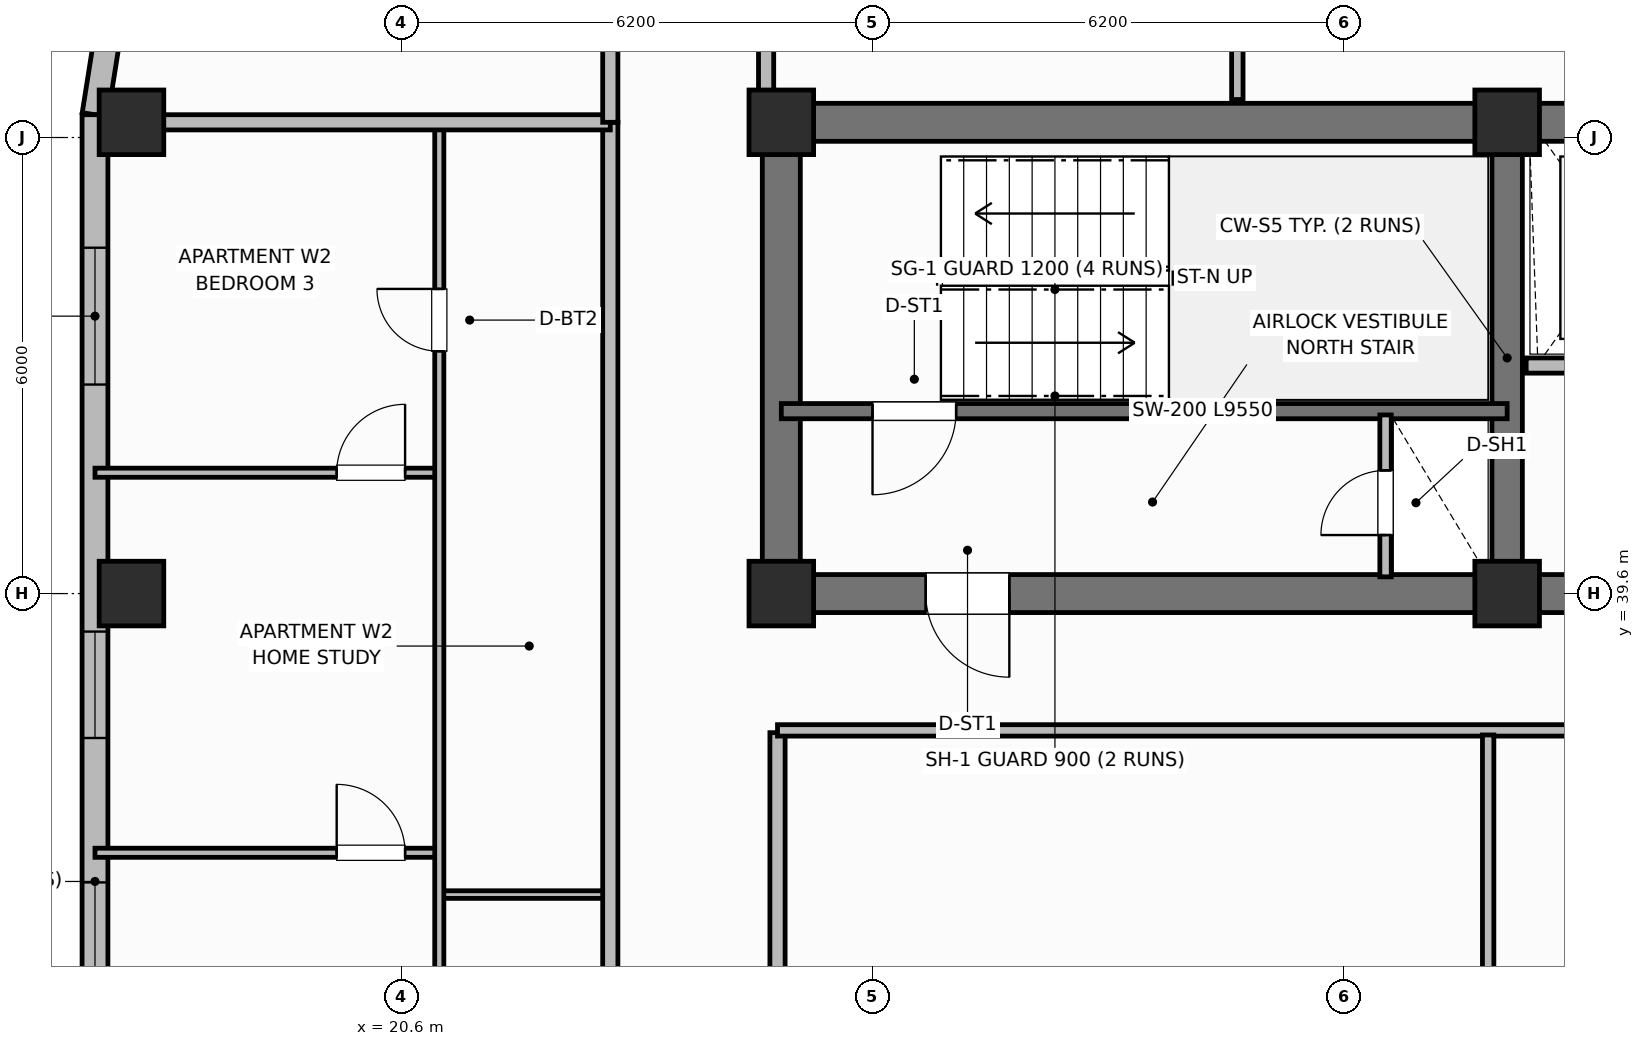
"""IFC4 building model, lengths in metres.
Left out: names, types, materials, properties, quantities, classifications, styles, units other than length and angle.
Written with IfcOpenShell. Run it as: python <this file> out.ifc"""

import sys

from ifc_helpers import new_model, si_unit, direction, frame, frame_2d, origin, origin_2d, place, context, subcontext, project, spatial, rectangle, extrude, element, fill, save


model = new_model("IFC4")
c1 = context("Model", 3, precision=1e-05, world=origin(), true_north=direction((0.0, 1.0)))
c2 = subcontext(c1, "Body", "Model", "MODEL_VIEW")
j1 = project(units=[si_unit("LENGTHUNIT", "METRE"), si_unit("PLANEANGLEUNIT", "RADIAN")], contexts=[c1])
p1 = place(None, origin())
s1 = spatial("IfcSite", under=j1, at=p1, CompositionType="ELEMENT")
p2 = place(p1, origin())
s2 = spatial("IfcBuilding", under=s1, at=p2, CompositionType="ELEMENT")
p3 = place(p2, frame((0.0, 0.0, 207.3)))
s3 = spatial("IfcBuildingStorey", under=s2, at=p3, CompositionType="ELEMENT", Elevation=207.3)
p4 = place(p3, frame((25.6, 45.8, 0.0), z_axis=(0.0, 0.0, 1.0), x_axis=(1.0, 0.0, 0.0)))
e1 = element("IfcWall", 1, at=p4, inside=s3, PredefinedType="SHEAR", context=c2, shape_type="SweptSolid", body=[
    extrude(rectangle(XDim=27.2, YDim=0.5, at=frame_2d((13.6, 0.0))), origin(), (0.0, 0.0, 1.0), 3.7),
])
p5 = place(p3, frame((25.6, 39.85, 0.0), z_axis=(0.0, 0.0, 1.0), x_axis=(0.0, 1.0, 0.0)))
e2 = element("IfcWall", 2, at=p5, inside=s3, PredefinedType="SHEAR", context=c2, shape_type="SweptSolid", body=[
    extrude(rectangle(XDim=5.7, YDim=0.5, at=frame_2d((2.85, 0.0))), origin(), (0.0, 0.0, 1.0), 3.7),
])
p6 = place(p3, frame((52.8, 39.6, 0.0), z_axis=(0.0, 0.0, 1.0), x_axis=(-1.0, 0.0, 0.0)))
e3 = element("IfcWall", 3, at=p6, inside=s3, PredefinedType="SHEAR", context=c2, shape_type="SweptSolid", body=[
    extrude(rectangle(XDim=27.2, YDim=0.5, at=frame_2d((13.6, 0.0))), origin(), (0.0, 0.0, 1.0), 3.7),
])
p7 = place(p6, frame((24.2, 0.0, 0.0)))
e4 = element("IfcOpeningElement", 4, at=p7, cuts=e3, PredefinedType="OPENING", context=c2, shape_type="SweptSolid", body=[
    extrude(rectangle(XDim=1.1, YDim=2.15, at=frame_2d((0.55, 1.075))), frame((0.0, 0.26, 0.0), z_axis=(0.0, -1.0, 0.0), x_axis=(1.0, 0.0, 0.0)), (0.0, 0.0, 1.0), 0.52),
])
p8 = place(p6, frame((15.1, 0.0, 0.0)))
e5 = element("IfcOpeningElement", 5, at=p8, cuts=e3, PredefinedType="OPENING", context=c2, shape_type="SweptSolid", body=[
    extrude(rectangle(XDim=1.2, YDim=2.15, at=frame_2d((0.6, 1.075))), frame((0.0, 0.26, 0.0), z_axis=(0.0, -1.0, 0.0), x_axis=(1.0, 0.0, 0.0)), (0.0, 0.0, 1.0), 0.52),
])
p9 = place(p6, frame((11.6, 0.0, 0.0)))
e6 = element("IfcOpeningElement", 6, at=p9, cuts=e3, PredefinedType="OPENING", context=c2, shape_type="SweptSolid", body=[
    extrude(rectangle(XDim=0.9, YDim=2.1, at=frame_2d((0.45, 1.05))), frame((0.0, 0.26, 0.0), z_axis=(0.0, -1.0, 0.0), x_axis=(1.0, 0.0, 0.0)), (0.0, 0.0, 1.0), 0.52),
])
p10 = place(p6, frame((7.35, 0.0, 0.0)))
e7 = element("IfcOpeningElement", 7, at=p10, cuts=e3, PredefinedType="OPENING", context=c2, shape_type="SweptSolid", body=[
    extrude(rectangle(XDim=0.85, YDim=2.1, at=frame_2d((0.425, 1.05))), frame((0.0, 0.26, 0.0), z_axis=(0.0, -1.0, 0.0), x_axis=(1.0, 0.0, 0.0)), (0.0, 0.0, 1.0), 0.52),
])
p11 = place(p6, frame((4.2, 0.0, 0.0)))
e8 = element("IfcOpeningElement", 8, at=p11, cuts=e3, PredefinedType="OPENING", context=c2, shape_type="SweptSolid", body=[
    extrude(rectangle(XDim=1.3, YDim=2.2, at=frame_2d((0.65, 1.1))), frame((0.0, 0.26, 0.0), z_axis=(0.0, -1.0, 0.0), x_axis=(1.0, 0.0, 0.0)), (0.0, 0.0, 1.0), 0.52),
])
p12 = place(p3, frame((35.15, 39.85, 0.0), z_axis=(0.0, 0.0, 1.0), x_axis=(0.0, 1.0, 0.0)))
e9 = element("IfcWall", 9, at=p12, inside=s3, PredefinedType="SHEAR", context=c2, shape_type="SweptSolid", body=[
    extrude(rectangle(XDim=5.7, YDim=0.4, at=frame_2d((2.85, 0.0))), origin(), (0.0, 0.0, 1.0), 3.7),
])
for number, where, z_axis, x_axis in (
    (10, (25.6, 39.6, 0.0), (0.0, 0.0, 1.0), (1.0, 0.0, 0.0)),
    (11, (25.6, 45.8, 0.0), (0.0, 0.0, 1.0), (1.0, 0.0, 0.0)),
    (12, (35.15, 39.6, 0.0), (0.0, 0.0, 1.0), (1.0, 0.0, 0.0)),
    (13, (35.15, 45.8, 0.0), (0.0, 0.0, 1.0), (1.0, 0.0, 0.0)),
    (14, (17.05, 39.6, 0.0), (0.0, 0.0, 1.0), (1.0, 0.0, 0.0)),
    (15, (17.05, 45.8, 0.0), (0.0, 0.0, 1.0), (1.0, 0.0, 0.0)),
):
    element("IfcColumn", number, at=place(p3, frame(where, z_axis=z_axis, x_axis=x_axis)), inside=s3, PredefinedType="COLUMN", context=c2, shape_type="SweptSolid", body=[
        extrude(rectangle(XDim=0.85, YDim=0.85, at=origin_2d()), origin(), (0.0, 0.0, 1.0), 3.7),
    ])
p13 = place(p3, frame((16.748, 47.022, 0.0), z_axis=(0.0, 0.0, 1.0), x_axis=(-0.156481329164, -0.987680916907, 0.0)))
e16 = element("IfcWall", 16, at=p13, inside=s3, PredefinedType="SOLIDWALL", context=c2, shape_type="SweptSolid", body=[
    extrude(rectangle(XDim=1.136, YDim=0.34, at=frame_2d((0.568, 0.0))), origin(), (0.0, 0.0, 1.0), 2.72),
])
p14 = place(p3, frame((16.57, 45.9, 0.0), z_axis=(0.0, 0.0, 1.0), x_axis=(0.0, -1.0, 0.0)))
e17 = element("IfcWall", 17, at=p14, inside=s3, PredefinedType="SOLIDWALL", context=c2, shape_type="SweptSolid", body=[
    extrude(rectangle(XDim=13.3, YDim=0.34, at=frame_2d((6.65, 0.0))), origin(), (0.0, 0.0, 1.0), 2.72),
])
p15 = place(p14, frame((1.75, 0.0, 0.75)))
e18 = element("IfcOpeningElement", 18, at=p15, cuts=e17, PredefinedType="OPENING", context=c2, shape_type="SweptSolid", body=[
    extrude(rectangle(XDim=1.8, YDim=1.85, at=frame_2d((0.9, 0.925))), frame((0.0, 0.18, 0.0), z_axis=(0.0, -1.0, 0.0), x_axis=(1.0, 0.0, 0.0)), (0.0, 0.0, 1.0), 0.36),
])
p16 = place(p14, frame((6.8, 0.0, 0.71)))
e19 = element("IfcOpeningElement", 19, at=p16, cuts=e17, PredefinedType="OPENING", context=c2, shape_type="SweptSolid", body=[
    extrude(rectangle(XDim=1.4, YDim=1.85, at=frame_2d((0.7, 0.925))), frame((0.0, 0.18, 0.0), z_axis=(0.0, -1.0, 0.0), x_axis=(1.0, 0.0, 0.0)), (0.0, 0.0, 1.0), 0.36),
])
p17 = place(p14, frame((10.1, 0.0, 0.75)))
e20 = element("IfcOpeningElement", 20, at=p17, cuts=e17, PredefinedType="OPENING", context=c2, shape_type="SweptSolid", body=[
    extrude(rectangle(XDim=1.8, YDim=1.85, at=frame_2d((0.9, 0.925))), frame((0.0, 0.18, 0.0), z_axis=(0.0, -1.0, 0.0), x_axis=(1.0, 0.0, 0.0)), (0.0, 0.0, 1.0), 0.36),
])
p18 = place(p3, frame((35.15, 42.0, 0.0), z_axis=(0.0, 0.0, 1.0), x_axis=(-1.0, 0.0, 0.0)))
e21 = element("IfcWall", 21, at=p18, inside=s3, PredefinedType="SHEAR", context=c2, shape_type="SweptSolid", body=[
    extrude(rectangle(XDim=9.55, YDim=0.2, at=frame_2d((4.775, 0.0))), origin(), (0.0, 0.0, 1.0), 3.7),
])
p19 = place(p18, frame((7.25, 0.0, 0.0)))
e22 = element("IfcOpeningElement", 22, at=p19, cuts=e21, PredefinedType="OPENING", context=c2, shape_type="SweptSolid", body=[
    extrude(rectangle(XDim=1.1, YDim=2.15, at=frame_2d((0.55, 1.075))), frame((0.0, 0.11, 0.0), z_axis=(0.0, -1.0, 0.0), x_axis=(1.0, 0.0, 0.0)), (0.0, 0.0, 1.0), 0.22),
])
p20 = place(p3, frame((33.55, 39.82, 0.0), z_axis=(0.0, 0.0, 1.0), x_axis=(0.0, 1.0, 0.0)))
e23 = element("IfcWall", 23, at=p20, inside=s3, PredefinedType="PARTITIONING", context=c2, shape_type="SweptSolid", body=[
    extrude(rectangle(XDim=2.13, YDim=0.15, at=frame_2d((1.065, 0.0))), origin(), (0.0, 0.0, 1.0), 2.55),
])
p21 = place(p20, frame((0.55, 0.0, 0.0)))
e24 = element("IfcOpeningElement", 24, at=p21, cuts=e23, PredefinedType="OPENING", context=c2, shape_type="SweptSolid", body=[
    extrude(rectangle(XDim=0.85, YDim=2.05, at=frame_2d((0.425, 1.025))), frame((0.0, 0.085, 0.0), z_axis=(0.0, -1.0, 0.0), x_axis=(1.0, 0.0, 0.0)), (0.0, 0.0, 1.0), 0.17),
])
p22 = place(p3, frame((37.95, 42.6, 0.0), z_axis=(0.0, 0.0, 1.0), x_axis=(-1.0, 0.0, 0.0)))
e25 = element("IfcWall", 25, at=p22, inside=s3, PredefinedType="PARTITIONING", context=c2, shape_type="SweptSolid", body=[
    extrude(rectangle(XDim=2.55, YDim=0.2, at=frame_2d((1.275, 0.0))), origin(), (0.0, 0.0, 1.0), 2.32),
])
p23 = place(p22, frame((0.75, 0.0, 0.0)))
e26 = element("IfcOpeningElement", 26, at=p23, cuts=e25, PredefinedType="OPENING", context=c2, shape_type="SweptSolid", body=[
    extrude(rectangle(XDim=1.1, YDim=2.15, at=frame_2d((0.55, 1.075))), frame((0.0, 0.11, 0.0), z_axis=(0.0, -1.0, 0.0), x_axis=(1.0, 0.0, 0.0)), (0.0, 0.0, 1.0), 0.22),
])
p24 = place(p3, frame((25.55, 18.63, 0.0), z_axis=(0.0, 0.0, 1.0), x_axis=(0.0, 1.0, 0.0)))
e27 = element("IfcWall", 27, at=p24, inside=s3, PredefinedType="PARTITIONING", context=c2, shape_type="SweptSolid", body=[
    extrude(rectangle(XDim=19.14, YDim=0.2, at=frame_2d((9.57, 0.0))), origin(), (0.0, 0.0, 1.0), 2.55),
])
p25 = place(p3, frame((25.55, 37.8, 0.0), z_axis=(0.0, 0.0, 1.0), x_axis=(1.0, 0.0, 0.0)))
e28 = element("IfcWall", 28, at=p25, inside=s3, PredefinedType="PARTITIONING", context=c2, shape_type="SweptSolid", body=[
    extrude(rectangle(XDim=22.2, YDim=0.15, at=frame_2d((11.1, 0.0))), origin(), (0.0, 0.0, 1.0), 2.55),
])
p26 = place(p3, frame((34.9, 18.66, 0.0), z_axis=(0.0, 0.0, 1.0), x_axis=(0.0, 1.0, 0.0)))
e29 = element("IfcWall", 29, at=p26, inside=s3, PredefinedType="PARTITIONING", context=c2, shape_type="SweptSolid", body=[
    extrude(rectangle(XDim=19.08, YDim=0.15, at=frame_2d((9.54, 0.0))), origin(), (0.0, 0.0, 1.0), 2.55),
])
p27 = place(p26, frame((5.0, 0.0, 0.0)))
e30 = element("IfcOpeningElement", 30, at=p27, cuts=e29, PredefinedType="OPENING", context=c2, shape_type="SweptSolid", body=[
    extrude(rectangle(XDim=1.0, YDim=2.15, at=frame_2d((0.5, 1.075))), frame((0.0, 0.085, 0.0), z_axis=(0.0, -1.0, 0.0), x_axis=(1.0, 0.0, 0.0)), (0.0, 0.0, 1.0), 0.17),
])
p28 = place(p3, frame((21.1, 35.64, 0.0), z_axis=(0.0, 0.0, 1.0), x_axis=(1.0, 0.0, 0.0)))
e31 = element("IfcWall", 31, at=p28, inside=s3, PredefinedType="PARTITIONING", context=c2, shape_type="SweptSolid", body=[
    extrude(rectangle(XDim=2.25, YDim=0.1, at=frame_2d((1.125, 0.0))), origin(), (0.0, 0.0, 1.0), 2.55),
])
p29 = place(p3, frame((16.57, 36.19, 0.0), z_axis=(0.0, 0.0, 1.0), x_axis=(1.0, 0.0, 0.0)))
e32 = element("IfcWall", 32, at=p29, inside=s3, PredefinedType="PARTITIONING", context=c2, shape_type="SweptSolid", body=[
    extrude(rectangle(XDim=4.53, YDim=0.12, at=frame_2d((2.265, 0.0))), origin(), (0.0, 0.0, 1.0), 2.55),
])
p30 = place(p29, frame((3.18, 0.0, 0.0)))
e33 = element("IfcOpeningElement", 33, at=p30, cuts=e32, PredefinedType="OPENING", context=c2, shape_type="SweptSolid", body=[
    extrude(rectangle(XDim=0.9, YDim=2.1, at=frame_2d((0.45, 1.05))), frame((0.0, 0.07, 0.0), z_axis=(0.0, -1.0, 0.0), x_axis=(1.0, 0.0, 0.0)), (0.0, 0.0, 1.0), 0.14),
])
p31 = place(p3, frame((16.57, 41.19, 0.0), z_axis=(0.0, 0.0, 1.0), x_axis=(1.0, 0.0, 0.0)))
e34 = element("IfcWall", 34, at=p31, inside=s3, PredefinedType="PARTITIONING", context=c2, shape_type="SweptSolid", body=[
    extrude(rectangle(XDim=4.53, YDim=0.12, at=frame_2d((2.265, 0.0))), origin(), (0.0, 0.0, 1.0), 2.55),
])
p32 = place(p31, frame((3.18, 0.0, 0.0)))
e35 = element("IfcOpeningElement", 35, at=p32, cuts=e34, PredefinedType="OPENING", context=c2, shape_type="SweptSolid", body=[
    extrude(rectangle(XDim=0.9, YDim=2.1, at=frame_2d((0.45, 1.05))), frame((0.0, 0.07, 0.0), z_axis=(0.0, -1.0, 0.0), x_axis=(1.0, 0.0, 0.0)), (0.0, 0.0, 1.0), 0.14),
])
p33 = place(p3, frame((21.1, 26.48, 0.0), z_axis=(0.0, 0.0, 1.0), x_axis=(0.0, 1.0, 0.0)))
e36 = element("IfcWall", 36, at=p33, inside=s3, PredefinedType="PARTITIONING", context=c2, shape_type="SweptSolid", body=[
    extrude(rectangle(XDim=19.28, YDim=0.12, at=frame_2d((9.64, 0.0))), origin(), (0.0, 0.0, 1.0), 2.55),
])
p34 = place(p33, frame((3.01, 0.0, 0.0)))
e37 = element("IfcOpeningElement", 37, at=p34, cuts=e36, PredefinedType="OPENING", context=c2, shape_type="SweptSolid", body=[
    extrude(rectangle(XDim=0.9, YDim=2.1, at=frame_2d((0.45, 1.05))), frame((0.0, 0.07, 0.0), z_axis=(0.0, -1.0, 0.0), x_axis=(1.0, 0.0, 0.0)), (0.0, 0.0, 1.0), 0.14),
])
p35 = place(p33, frame((16.308, 0.0, 0.0)))
e38 = element("IfcOpeningElement", 38, at=p35, cuts=e36, PredefinedType="OPENING", context=c2, shape_type="SweptSolid", body=[
    extrude(rectangle(XDim=0.82, YDim=2.08, at=frame_2d((0.41, 1.04))), frame((0.0, 0.07, 0.0), z_axis=(0.0, -1.0, 0.0), x_axis=(1.0, 0.0, 0.0)), (0.0, 0.0, 1.0), 0.14),
])
p36 = place(p3, frame((23.35, 10.6, 0.0), z_axis=(0.0, 0.0, 1.0), x_axis=(0.0, 1.0, 0.0)))
e39 = element("IfcWall", 39, at=p36, inside=s3, PredefinedType="PARTITIONING", context=c2, shape_type="SweptSolid", body=[
    extrude(rectangle(XDim=35.2, YDim=0.2, at=frame_2d((17.6, 0.0))), origin(), (0.0, 0.0, 1.0), 2.55),
])
p37 = place(p36, frame((2.65, 0.0, 0.0)))
e40 = element("IfcOpeningElement", 40, at=p37, cuts=e39, PredefinedType="OPENING", context=c2, shape_type="SweptSolid", body=[
    extrude(rectangle(XDim=1.0, YDim=2.15, at=frame_2d((0.5, 1.075))), frame((0.0, 0.11, 0.0), z_axis=(0.0, -1.0, 0.0), x_axis=(1.0, 0.0, 0.0)), (0.0, 0.0, 1.0), 0.22),
])
p38 = place(p36, frame((19.79, 0.0, 0.0)))
e41 = element("IfcOpeningElement", 41, at=p38, cuts=e39, PredefinedType="OPENING", context=c2, shape_type="SweptSolid", body=[
    extrude(rectangle(XDim=1.0, YDim=2.15, at=frame_2d((0.5, 1.075))), frame((0.0, 0.11, 0.0), z_axis=(0.0, -1.0, 0.0), x_axis=(1.0, 0.0, 0.0)), (0.0, 0.0, 1.0), 0.22),
])
p39 = place(p3, frame((16.99, 45.8, 0.0), z_axis=(0.0, 0.0, 1.0), x_axis=(1.0, 0.0, 0.0)))
e42 = element("IfcWall", 42, at=p39, inside=s3, PredefinedType="PARTITIONING", context=c2, shape_type="SweptSolid", body=[
    extrude(rectangle(XDim=6.36, YDim=0.2, at=frame_2d((3.18, 0.0))), origin(), (0.0, 0.0, 1.0), 2.55),
])
p40 = place(p3, frame((23.35, 45.8, 0.0), z_axis=(0.0, 0.0, 1.0), x_axis=(0.0, 1.0, 0.0)))
e43 = element("IfcWall", 43, at=p40, inside=s3, PredefinedType="PARTITIONING", context=c2, shape_type="SweptSolid", body=[
    extrude(rectangle(XDim=3.73, YDim=0.2, at=frame_2d((1.865, 0.0))), origin(), (0.0, 0.0, 1.0), 2.55),
])
p41 = place(p3, frame((31.6, 46.1, 0.0), z_axis=(0.0, 0.0, 1.0), x_axis=(0.0, 1.0, 0.0)))
e44 = element("IfcWall", 44, at=p41, inside=s3, PredefinedType="PARTITIONING", context=c2, shape_type="SweptSolid", body=[
    extrude(rectangle(XDim=3.43, YDim=0.15, at=frame_2d((1.715, 0.0))), origin(), (0.0, 0.0, 1.0), 2.55),
])
p42 = place(p41, frame((0.85, 0.0, 0.0)))
e45 = element("IfcOpeningElement", 45, at=p42, cuts=e44, PredefinedType="OPENING", context=c2, shape_type="SweptSolid", body=[
    extrude(rectangle(XDim=0.9, YDim=2.1, at=frame_2d((0.45, 1.05))), frame((0.0, 0.085, 0.0), z_axis=(0.0, -1.0, 0.0), x_axis=(1.0, 0.0, 0.0)), (0.0, 0.0, 1.0), 0.17),
])
p43 = place(p3, frame((25.4, 46.1, 0.0), z_axis=(0.0, 0.0, 1.0), x_axis=(0.0, 1.0, 0.0)))
e46 = element("IfcWall", 46, at=p43, inside=s3, PredefinedType="PARTITIONING", context=c2, shape_type="SweptSolid", body=[
    extrude(rectangle(XDim=2.73, YDim=0.2, at=frame_2d((1.365, 0.0))), origin(), (0.0, 0.0, 1.0), 2.55),
])
p44 = place(p43, frame((0.65, 0.0, 0.0)))
e47 = element("IfcOpeningElement", 47, at=p44, cuts=e46, PredefinedType="OPENING", context=c2, shape_type="SweptSolid", body=[
    extrude(rectangle(XDim=0.9, YDim=2.1, at=frame_2d((0.45, 1.05))), frame((0.0, 0.11, 0.0), z_axis=(0.0, -1.0, 0.0), x_axis=(1.0, 0.0, 0.0)), (0.0, 0.0, 1.0), 0.22),
])
p45 = place(p15, origin())
e48 = element("IfcWindow", 48, at=p45, inside=s3, PartitioningType="SINGLE_PANEL", PredefinedType="WINDOW", context=c2, shape_type="SweptSolid", body=[
    extrude(rectangle(XDim=1.8, YDim=1.85, at=frame_2d((0.9, 0.925))), frame((0.0, 0.03, 0.0), z_axis=(0.0, -1.0, 0.0), x_axis=(1.0, 0.0, 0.0)), (0.0, 0.0, 1.0), 0.06),
])
fill(e18, e48)
p46 = place(p16, origin())
e49 = element("IfcWindow", 49, at=p46, inside=s3, PartitioningType="SINGLE_PANEL", PredefinedType="WINDOW", context=c2, shape_type="SweptSolid", body=[
    extrude(rectangle(XDim=1.4, YDim=1.85, at=frame_2d((0.7, 0.925))), frame((0.0, 0.03, 0.0), z_axis=(0.0, -1.0, 0.0), x_axis=(1.0, 0.0, 0.0)), (0.0, 0.0, 1.0), 0.06),
])
fill(e19, e49)
p47 = place(p17, origin())
e50 = element("IfcWindow", 50, at=p47, inside=s3, PartitioningType="SINGLE_PANEL", PredefinedType="WINDOW", context=c2, shape_type="SweptSolid", body=[
    extrude(rectangle(XDim=1.8, YDim=1.85, at=frame_2d((0.9, 0.925))), frame((0.0, 0.03, 0.0), z_axis=(0.0, -1.0, 0.0), x_axis=(1.0, 0.0, 0.0)), (0.0, 0.0, 1.0), 0.06),
])
fill(e20, e50)
p48 = place(p19, origin())
e51 = element("IfcDoor", 51, at=p48, inside=s3, OperationType="SINGLE_SWING_RIGHT", PredefinedType="DOOR", context=c2, shape_type="SweptSolid", body=[
    extrude(rectangle(XDim=1.1, YDim=2.15, at=frame_2d((0.55, 1.075))), frame((0.0, 0.025, 0.0), z_axis=(0.0, -1.0, 0.0), x_axis=(1.0, 0.0, 0.0)), (0.0, 0.0, 1.0), 0.05),
])
fill(e22, e51)
p49 = place(p21, origin())
e52 = element("IfcDoor", 52, at=p49, inside=s3, OperationType="SINGLE_SWING_LEFT", PredefinedType="TRAPDOOR", context=c2, shape_type="SweptSolid", body=[
    extrude(rectangle(XDim=0.85, YDim=2.05, at=frame_2d((0.425, 1.025))), frame((0.0, 0.025, 0.0), z_axis=(0.0, -1.0, 0.0), x_axis=(1.0, 0.0, 0.0)), (0.0, 0.0, 1.0), 0.05),
])
fill(e24, e52)
p50 = place(p30, origin())
e53 = element("IfcDoor", 53, at=p50, inside=s3, OperationType="SINGLE_SWING_LEFT", PredefinedType="DOOR", context=c2, shape_type="SweptSolid", body=[
    extrude(rectangle(XDim=0.9, YDim=2.1, at=frame_2d((0.45, 1.05))), frame((0.0, 0.025, 0.0), z_axis=(0.0, -1.0, 0.0), x_axis=(1.0, 0.0, 0.0)), (0.0, 0.0, 1.0), 0.05),
])
fill(e33, e53)
p51 = place(p32, origin())
e54 = element("IfcDoor", 54, at=p51, inside=s3, OperationType="SINGLE_SWING_RIGHT", PredefinedType="DOOR", context=c2, shape_type="SweptSolid", body=[
    extrude(rectangle(XDim=0.9, YDim=2.1, at=frame_2d((0.45, 1.05))), frame((0.0, 0.025, 0.0), z_axis=(0.0, -1.0, 0.0), x_axis=(1.0, 0.0, 0.0)), (0.0, 0.0, 1.0), 0.05),
])
fill(e35, e54)
p52 = place(p35, origin())
e55 = element("IfcDoor", 55, at=p52, inside=s3, OperationType="SINGLE_SWING_RIGHT", PredefinedType="DOOR", context=c2, shape_type="SweptSolid", body=[
    extrude(rectangle(XDim=0.82, YDim=2.08, at=frame_2d((0.41, 1.04))), frame((0.0, 0.025, 0.0), z_axis=(0.0, -1.0, 0.0), x_axis=(1.0, 0.0, 0.0)), (0.0, 0.0, 1.0), 0.05),
])
fill(e38, e55)
p53 = place(p7, origin())
e56 = element("IfcDoor", 56, at=p53, inside=s3, OperationType="SINGLE_SWING_LEFT", PredefinedType="DOOR", context=c2, shape_type="SweptSolid", body=[
    extrude(rectangle(XDim=1.1, YDim=2.15, at=frame_2d((0.55, 1.075))), frame((0.0, 0.025, 0.0), z_axis=(0.0, -1.0, 0.0), x_axis=(1.0, 0.0, 0.0)), (0.0, 0.0, 1.0), 0.05),
])
fill(e4, e56)
save(model, sys.argv[1])
